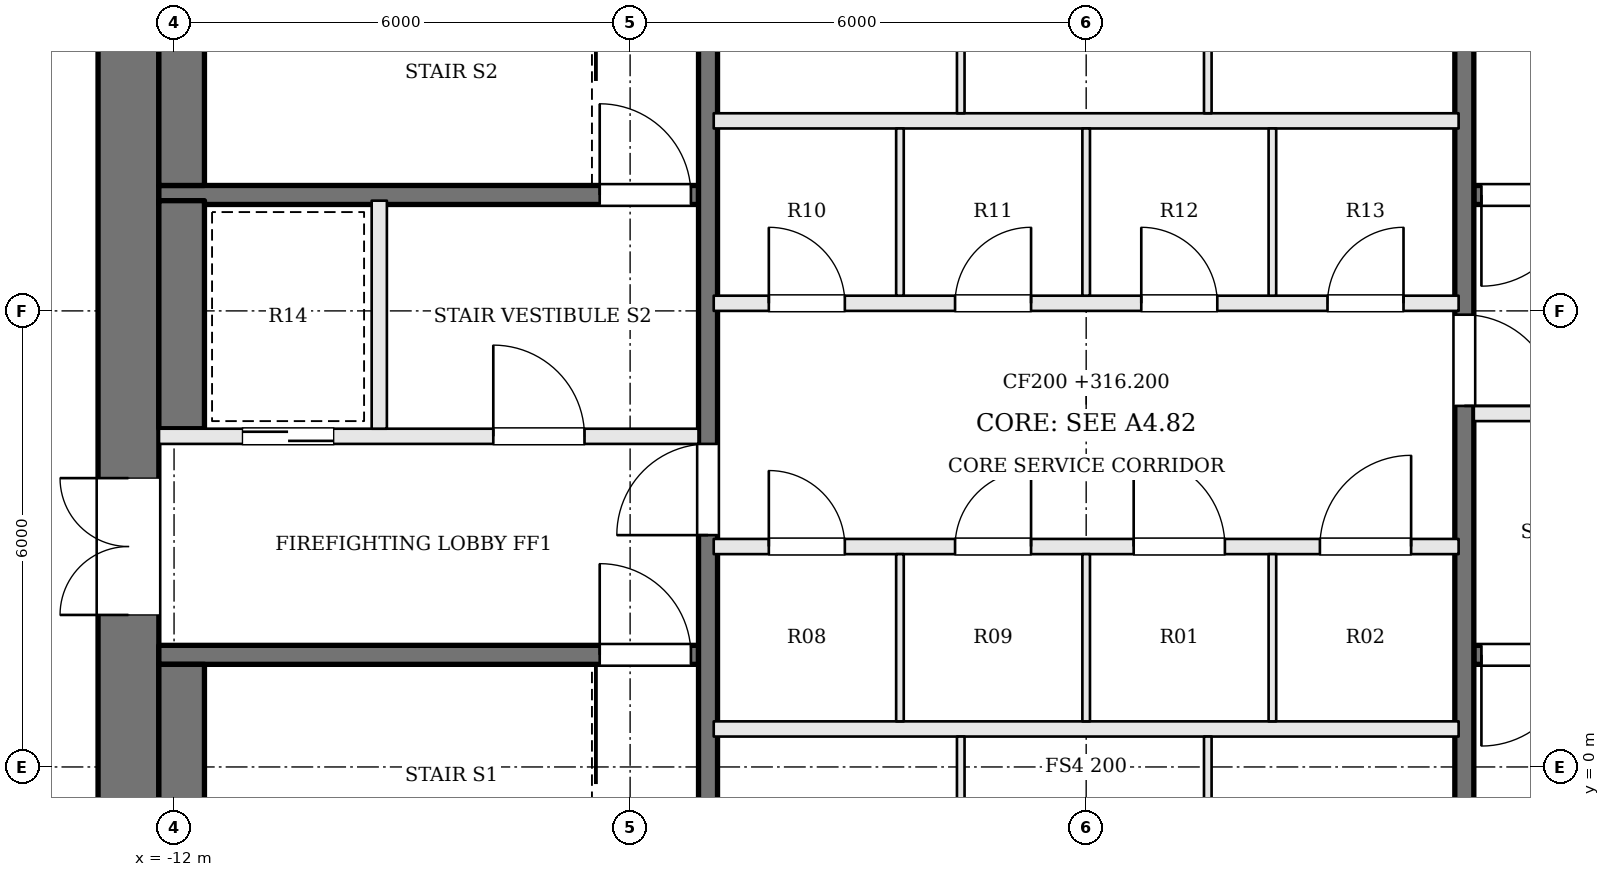
"""IFC4 building model, lengths in metres.
Left out: names, types, materials, properties, quantities, classifications, styles, units other than length and angle.
Written with IfcOpenShell. Run it as: python <this file> out.ifc"""

import sys

from ifc_helpers import new_model, si_unit, direction, frame, frame_2d, origin, place, context, subcontext, project, spatial, rectangle, extrude, element, fill, save


model = new_model("IFC4")
c1 = context("Model", 3, precision=1e-05, world=origin(), true_north=direction((0.0, 1.0)))
c2 = subcontext(c1, "Body", "Model", "MODEL_VIEW")
j1 = project(units=[si_unit("LENGTHUNIT", "METRE"), si_unit("PLANEANGLEUNIT", "RADIAN")], contexts=[c1])
p1 = place(None, origin())
s1 = spatial("IfcSite", under=j1, at=p1, CompositionType="ELEMENT")
p2 = place(p1, origin())
s2 = spatial("IfcBuilding", under=s1, at=p2, CompositionType="ELEMENT")
p3 = place(p2, frame((0.0, 0.0, 316.2)))
s3 = spatial("IfcBuildingStorey", under=s2, at=p3, CompositionType="ELEMENT", Elevation=316.2)
p4 = place(p3, frame((-12.6, -2.2, 0.0), z_axis=(0.0, 0.0, 1.0), x_axis=(0.0, 1.0, 0.0)))
e1 = element("IfcWall", 1, at=p4, inside=s3, PredefinedType="SHEAR", context=c2, shape_type="SweptSolid", body=[
    extrude(rectangle(XDim=13.4, YDim=0.8, at=frame_2d((6.7, 0.0))), origin(), (0.0, 0.0, 1.0), 4.0),
])
p5 = place(p4, frame((4.2, 0.0, 0.0)))
e2 = element("IfcOpeningElement", 2, at=p5, cuts=e1, PredefinedType="OPENING", context=c2, shape_type="SweptSolid", body=[
    extrude(rectangle(XDim=1.8, YDim=2.1, at=frame_2d((0.9, 1.05))), frame((0.0, 0.41, 0.0), z_axis=(0.0, -1.0, 0.0), x_axis=(1.0, 0.0, 0.0)), (0.0, 0.0, 1.0), 0.82),
])
p6 = place(p3, frame((-12.2, 1.475, 0.0), z_axis=(0.0, 0.0, 1.0), x_axis=(1.0, 0.0, 0.0)))
e3 = element("IfcWall", 3, at=p6, inside=s3, PredefinedType="SOLIDWALL", context=c2, shape_type="SweptSolid", body=[
    extrude(rectangle(XDim=7.1, YDim=0.25, at=frame_2d((3.55, 0.0))), origin(), (0.0, 0.0, 1.0), 3.28),
])
p7 = place(p6, frame((5.8, 0.0, 0.0)))
e4 = element("IfcOpeningElement", 4, at=p7, cuts=e3, PredefinedType="OPENING", context=c2, shape_type="SweptSolid", body=[
    extrude(rectangle(XDim=1.2, YDim=2.1, at=frame_2d((0.6, 1.05))), frame((0.0, 0.135, 0.0), z_axis=(0.0, -1.0, 0.0), x_axis=(1.0, 0.0, 0.0)), (0.0, 0.0, 1.0), 0.27),
])
p8 = place(p3, frame((12.2, 7.525, 0.0), z_axis=(0.0, 0.0, 1.0), x_axis=(-1.0, 0.0, 0.0)))
e5 = element("IfcWall", 5, at=p8, inside=s3, PredefinedType="SOLIDWALL", context=c2, shape_type="SweptSolid", body=[
    extrude(rectangle(XDim=7.1, YDim=0.25, at=frame_2d((3.55, 0.0))), origin(), (0.0, 0.0, 1.0), 3.28),
])
p9 = place(p8, frame((5.8, 0.0, 0.0)))
e6 = element("IfcOpeningElement", 6, at=p9, cuts=e5, PredefinedType="OPENING", context=c2, shape_type="SweptSolid", body=[
    extrude(rectangle(XDim=1.2, YDim=2.1, at=frame_2d((0.6, 1.05))), frame((0.0, 0.135, 0.0), z_axis=(0.0, -1.0, 0.0), x_axis=(1.0, 0.0, 0.0)), (0.0, 0.0, 1.0), 0.27),
])
p10 = place(p3, frame((-12.2, 4.35, 0.0), z_axis=(0.0, 0.0, 1.0), x_axis=(1.0, 0.0, 0.0)))
e7 = element("IfcWall", 7, at=p10, inside=s3, PredefinedType="SOLIDWALL", context=c2, shape_type="SweptSolid", body=[
    extrude(rectangle(XDim=7.1, YDim=0.2, at=frame_2d((3.55, 0.0))), origin(), (0.0, 0.0, 1.0), 3.28),
])
p11 = place(p10, frame((4.4, 0.0, 0.0)))
e8 = element("IfcOpeningElement", 8, at=p11, cuts=e7, PredefinedType="OPENING", context=c2, shape_type="SweptSolid", body=[
    extrude(rectangle(XDim=1.2, YDim=2.1, at=frame_2d((0.6, 1.05))), frame((0.0, 0.11, 0.0), z_axis=(0.0, -1.0, 0.0), x_axis=(1.0, 0.0, 0.0)), (0.0, 0.0, 1.0), 0.22),
])
p12 = place(p10, frame((1.1, 0.0, 0.0)))
e9 = element("IfcOpeningElement", 9, at=p12, cuts=e7, PredefinedType="OPENING", context=c2, shape_type="SweptSolid", body=[
    extrude(rectangle(XDim=1.2, YDim=2.1, at=frame_2d((0.6, 1.05))), frame((0.0, 0.11, 0.0), z_axis=(0.0, -1.0, 0.0), x_axis=(1.0, 0.0, 0.0)), (0.0, 0.0, 1.0), 0.22),
])
p13 = place(p3, frame((12.2, 4.65, 0.0), z_axis=(0.0, 0.0, 1.0), x_axis=(-1.0, 0.0, 0.0)))
e10 = element("IfcWall", 10, at=p13, inside=s3, PredefinedType="SOLIDWALL", context=c2, shape_type="SweptSolid", body=[
    extrude(rectangle(XDim=7.1, YDim=0.2, at=frame_2d((3.55, 0.0))), origin(), (0.0, 0.0, 1.0), 3.28),
])
p14 = place(p13, frame((4.4, 0.0, 0.0)))
e11 = element("IfcOpeningElement", 11, at=p14, cuts=e10, PredefinedType="OPENING", context=c2, shape_type="SweptSolid", body=[
    extrude(rectangle(XDim=1.2, YDim=2.1, at=frame_2d((0.6, 1.05))), frame((0.0, 0.11, 0.0), z_axis=(0.0, -1.0, 0.0), x_axis=(1.0, 0.0, 0.0)), (0.0, 0.0, 1.0), 0.22),
])
p15 = place(p13, frame((1.1, 0.0, 0.0)))
e12 = element("IfcOpeningElement", 12, at=p15, cuts=e10, PredefinedType="OPENING", context=c2, shape_type="SweptSolid", body=[
    extrude(rectangle(XDim=1.2, YDim=2.1, at=frame_2d((0.6, 1.05))), frame((0.0, 0.11, 0.0), z_axis=(0.0, -1.0, 0.0), x_axis=(1.0, 0.0, 0.0)), (0.0, 0.0, 1.0), 0.22),
])
p16 = place(p3, frame((-12.2, 7.525, 0.0), z_axis=(0.0, 0.0, 1.0), x_axis=(1.0, 0.0, 0.0)))
e13 = element("IfcWall", 13, at=p16, inside=s3, PredefinedType="SOLIDWALL", context=c2, shape_type="SweptSolid", body=[
    extrude(rectangle(XDim=7.1, YDim=0.25, at=frame_2d((3.55, 0.0))), origin(), (0.0, 0.0, 1.0), 3.28),
])
p17 = place(p16, frame((5.8, 0.0, 0.0)))
e14 = element("IfcOpeningElement", 14, at=p17, cuts=e13, PredefinedType="OPENING", context=c2, shape_type="SweptSolid", body=[
    extrude(rectangle(XDim=1.2, YDim=2.1, at=frame_2d((0.6, 1.05))), frame((0.0, 0.135, 0.0), z_axis=(0.0, -1.0, 0.0), x_axis=(1.0, 0.0, 0.0)), (0.0, 0.0, 1.0), 0.27),
])
p18 = place(p3, frame((12.2, 1.475, 0.0), z_axis=(0.0, 0.0, 1.0), x_axis=(-1.0, 0.0, 0.0)))
e15 = element("IfcWall", 15, at=p18, inside=s3, PredefinedType="SOLIDWALL", context=c2, shape_type="SweptSolid", body=[
    extrude(rectangle(XDim=7.1, YDim=0.25, at=frame_2d((3.55, 0.0))), origin(), (0.0, 0.0, 1.0), 3.28),
])
p19 = place(p18, frame((5.8, 0.0, 0.0)))
e16 = element("IfcOpeningElement", 16, at=p19, cuts=e15, PredefinedType="OPENING", context=c2, shape_type="SweptSolid", body=[
    extrude(rectangle(XDim=1.2, YDim=2.1, at=frame_2d((0.6, 1.05))), frame((0.0, 0.135, 0.0), z_axis=(0.0, -1.0, 0.0), x_axis=(1.0, 0.0, 0.0)), (0.0, 0.0, 1.0), 0.27),
])
p20 = place(p3, frame((-9.3, 4.45, 0.0), z_axis=(0.0, 0.0, 1.0), x_axis=(0.0, 1.0, 0.0)))
e17 = element("IfcWall", 17, at=p20, inside=s3, PredefinedType="SOLIDWALL", context=c2, shape_type="SweptSolid", body=[
    extrude(rectangle(XDim=3.0, YDim=0.2, at=frame_2d((1.5, 0.0))), origin(), (0.0, 0.0, 1.0), 3.28),
])
p21 = place(p3, frame((-4.975, -2.2, 0.0), z_axis=(0.0, 0.0, 1.0), x_axis=(0.0, 1.0, 0.0)))
e18 = element("IfcWall", 18, at=p21, inside=s3, PredefinedType="SOLIDWALL", context=c2, shape_type="SweptSolid", body=[
    extrude(rectangle(XDim=13.4, YDim=0.25, at=frame_2d((6.7, 0.0))), origin(), (0.0, 0.0, 1.0), 3.28),
])
p22 = place(p21, frame((5.25, 0.0, 0.0)))
e19 = element("IfcOpeningElement", 19, at=p22, cuts=e18, PredefinedType="OPENING", context=c2, shape_type="SweptSolid", body=[
    extrude(rectangle(XDim=1.2, YDim=2.1, at=frame_2d((0.6, 1.05))), frame((0.0, 0.135, 0.0), z_axis=(0.0, -1.0, 0.0), x_axis=(1.0, 0.0, 0.0)), (0.0, 0.0, 1.0), 0.27),
])
p23 = place(p3, frame((4.975, 11.2, 0.0), z_axis=(0.0, 0.0, 1.0), x_axis=(0.0, -1.0, 0.0)))
e20 = element("IfcWall", 20, at=p23, inside=s3, PredefinedType="SOLIDWALL", context=c2, shape_type="SweptSolid", body=[
    extrude(rectangle(XDim=13.4, YDim=0.25, at=frame_2d((6.7, 0.0))), origin(), (0.0, 0.0, 1.0), 3.28),
])
p24 = place(p23, frame((5.25, 0.0, 0.0)))
e21 = element("IfcOpeningElement", 21, at=p24, cuts=e20, PredefinedType="OPENING", context=c2, shape_type="SweptSolid", body=[
    extrude(rectangle(XDim=1.2, YDim=2.1, at=frame_2d((0.6, 1.05))), frame((0.0, 0.135, 0.0), z_axis=(0.0, -1.0, 0.0), x_axis=(1.0, 0.0, 0.0)), (0.0, 0.0, 1.0), 0.27),
])
p25 = place(p3, frame((-11.9, -1.6, 0.0), z_axis=(0.0, 0.0, 1.0), x_axis=(0.0, 1.0, 0.0)))
e22 = element("IfcWall", 22, at=p25, inside=s3, PredefinedType="SOLIDWALL", context=c2, shape_type="SweptSolid", body=[
    extrude(rectangle(XDim=2.95, YDim=0.6, at=frame_2d((1.475, 0.0))), origin(), (0.0, 0.0, 1.0), 3.28),
])
p26 = place(p3, frame((-11.9, 4.45, 0.0), z_axis=(0.0, 0.0, 1.0), x_axis=(0.0, 1.0, 0.0)))
e23 = element("IfcWall", 23, at=p26, inside=s3, PredefinedType="SOLIDWALL", context=c2, shape_type="SweptSolid", body=[
    extrude(rectangle(XDim=3.0, YDim=0.6, at=frame_2d((1.5, 0.0))), origin(), (0.0, 0.0, 1.0), 3.28),
])
p27 = place(p3, frame((-11.9, 7.65, 0.0), z_axis=(0.0, 0.0, 1.0), x_axis=(0.0, 1.0, 0.0)))
e24 = element("IfcWall", 24, at=p27, inside=s3, PredefinedType="SOLIDWALL", context=c2, shape_type="SweptSolid", body=[
    extrude(rectangle(XDim=2.95, YDim=0.6, at=frame_2d((1.475, 0.0))), origin(), (0.0, 0.0, 1.0), 3.28),
])
p28 = place(p3, frame((-4.9, 0.5, 0.0), z_axis=(0.0, 0.0, 1.0), x_axis=(1.0, 0.0, 0.0)))
e25 = element("IfcWall", 25, at=p28, inside=s3, PredefinedType="SOLIDWALL", context=c2, shape_type="SweptSolid", body=[
    extrude(rectangle(XDim=9.8, YDim=0.2, at=frame_2d((4.9, 0.0))), origin(), (0.0, 0.0, 1.0), 3.28),
])
p29 = place(p3, frame((-4.9, 2.9, 0.0), z_axis=(0.0, 0.0, 1.0), x_axis=(1.0, 0.0, 0.0)))
e26 = element("IfcWall", 26, at=p29, inside=s3, PredefinedType="SOLIDWALL", context=c2, shape_type="SweptSolid", body=[
    extrude(rectangle(XDim=9.8, YDim=0.2, at=frame_2d((4.9, 0.0))), origin(), (0.0, 0.0, 1.0), 3.28),
])
p30 = place(p29, frame((0.725, 0.0, 0.0)))
e27 = element("IfcOpeningElement", 27, at=p30, cuts=e26, PredefinedType="OPENING", context=c2, shape_type="SweptSolid", body=[
    extrude(rectangle(XDim=1.0, YDim=2.1, at=frame_2d((0.5, 1.05))), frame((0.0, 0.11, 0.0), z_axis=(0.0, -1.0, 0.0), x_axis=(1.0, 0.0, 0.0)), (0.0, 0.0, 1.0), 0.22),
])
p31 = place(p29, frame((3.175, 0.0, 0.0)))
e28 = element("IfcOpeningElement", 28, at=p31, cuts=e26, PredefinedType="OPENING", context=c2, shape_type="SweptSolid", body=[
    extrude(rectangle(XDim=1.0, YDim=2.1, at=frame_2d((0.5, 1.05))), frame((0.0, 0.11, 0.0), z_axis=(0.0, -1.0, 0.0), x_axis=(1.0, 0.0, 0.0)), (0.0, 0.0, 1.0), 0.22),
])
p32 = place(p29, frame((5.525, 0.0, 0.0)))
e29 = element("IfcOpeningElement", 29, at=p32, cuts=e26, PredefinedType="OPENING", context=c2, shape_type="SweptSolid", body=[
    extrude(rectangle(XDim=1.2, YDim=2.1, at=frame_2d((0.6, 1.05))), frame((0.0, 0.11, 0.0), z_axis=(0.0, -1.0, 0.0), x_axis=(1.0, 0.0, 0.0)), (0.0, 0.0, 1.0), 0.22),
])
p33 = place(p29, frame((7.975, 0.0, 0.0)))
e30 = element("IfcOpeningElement", 30, at=p33, cuts=e26, PredefinedType="OPENING", context=c2, shape_type="SweptSolid", body=[
    extrude(rectangle(XDim=1.2, YDim=2.1, at=frame_2d((0.6, 1.05))), frame((0.0, 0.11, 0.0), z_axis=(0.0, -1.0, 0.0), x_axis=(1.0, 0.0, 0.0)), (0.0, 0.0, 1.0), 0.22),
])
p34 = place(p3, frame((-4.9, 6.1, 0.0), z_axis=(0.0, 0.0, 1.0), x_axis=(1.0, 0.0, 0.0)))
e31 = element("IfcWall", 31, at=p34, inside=s3, PredefinedType="SOLIDWALL", context=c2, shape_type="SweptSolid", body=[
    extrude(rectangle(XDim=9.8, YDim=0.2, at=frame_2d((4.9, 0.0))), origin(), (0.0, 0.0, 1.0), 3.28),
])
p35 = place(p34, frame((0.725, 0.0, 0.0)))
e32 = element("IfcOpeningElement", 32, at=p35, cuts=e31, PredefinedType="OPENING", context=c2, shape_type="SweptSolid", body=[
    extrude(rectangle(XDim=1.0, YDim=2.1, at=frame_2d((0.5, 1.05))), frame((0.0, 0.11, 0.0), z_axis=(0.0, -1.0, 0.0), x_axis=(1.0, 0.0, 0.0)), (0.0, 0.0, 1.0), 0.22),
])
p36 = place(p34, frame((3.175, 0.0, 0.0)))
e33 = element("IfcOpeningElement", 33, at=p36, cuts=e31, PredefinedType="OPENING", context=c2, shape_type="SweptSolid", body=[
    extrude(rectangle(XDim=1.0, YDim=2.1, at=frame_2d((0.5, 1.05))), frame((0.0, 0.11, 0.0), z_axis=(0.0, -1.0, 0.0), x_axis=(1.0, 0.0, 0.0)), (0.0, 0.0, 1.0), 0.22),
])
p37 = place(p34, frame((5.625, 0.0, 0.0)))
e34 = element("IfcOpeningElement", 34, at=p37, cuts=e31, PredefinedType="OPENING", context=c2, shape_type="SweptSolid", body=[
    extrude(rectangle(XDim=1.0, YDim=2.1, at=frame_2d((0.5, 1.05))), frame((0.0, 0.11, 0.0), z_axis=(0.0, -1.0, 0.0), x_axis=(1.0, 0.0, 0.0)), (0.0, 0.0, 1.0), 0.22),
])
p38 = place(p34, frame((8.075, 0.0, 0.0)))
e35 = element("IfcOpeningElement", 35, at=p38, cuts=e31, PredefinedType="OPENING", context=c2, shape_type="SweptSolid", body=[
    extrude(rectangle(XDim=1.0, YDim=2.1, at=frame_2d((0.5, 1.05))), frame((0.0, 0.11, 0.0), z_axis=(0.0, -1.0, 0.0), x_axis=(1.0, 0.0, 0.0)), (0.0, 0.0, 1.0), 0.22),
])
p39 = place(p3, frame((-4.9, 8.5, 0.0), z_axis=(0.0, 0.0, 1.0), x_axis=(1.0, 0.0, 0.0)))
e36 = element("IfcWall", 36, at=p39, inside=s3, PredefinedType="SOLIDWALL", context=c2, shape_type="SweptSolid", body=[
    extrude(rectangle(XDim=9.8, YDim=0.2, at=frame_2d((4.9, 0.0))), origin(), (0.0, 0.0, 1.0), 3.28),
])
for number, where, z_axis, x_axis in (
    (37, (-2.45, 0.6, 0.0), (0.0, 0.0, 1.0), (0.0, 1.0, 0.0)),
    (38, (0.0, 0.6, 0.0), (0.0, 0.0, 1.0), (0.0, 1.0, 0.0)),
    (39, (2.45, 0.6, 0.0), (0.0, 0.0, 1.0), (0.0, 1.0, 0.0)),
    (40, (-2.45, 6.2, 0.0), (0.0, 0.0, 1.0), (0.0, 1.0, 0.0)),
    (41, (0.0, 6.2, 0.0), (0.0, 0.0, 1.0), (0.0, 1.0, 0.0)),
    (42, (2.45, 6.2, 0.0), (0.0, 0.0, 1.0), (0.0, 1.0, 0.0)),
):
    element("IfcWall", number, at=place(p3, frame(where, z_axis=z_axis, x_axis=x_axis)), inside=s3, PredefinedType="PARTITIONING", context=c2, shape_type="SweptSolid", body=[
        extrude(rectangle(XDim=2.2, YDim=0.1, at=frame_2d((1.1, 0.0))), origin(), (0.0, 0.0, 1.0), 3.28),
    ])
for number, where, z_axis, x_axis in (
    (43, (-1.65, -2.2, 0.0), (0.0, 0.0, 1.0), (0.0, 1.0, 0.0)),
    (44, (1.6, -2.2, 0.0), (0.0, 0.0, 1.0), (0.0, 1.0, 0.0)),
    (45, (-1.65, 8.6, 0.0), (0.0, 0.0, 1.0), (0.0, 1.0, 0.0)),
    (46, (1.6, 8.6, 0.0), (0.0, 0.0, 1.0), (0.0, 1.0, 0.0)),
):
    element("IfcWall", number, at=place(p3, frame(where, z_axis=z_axis, x_axis=x_axis)), inside=s3, PredefinedType="PARTITIONING", context=c2, shape_type="SweptSolid", body=[
        extrude(rectangle(XDim=2.6, YDim=0.1, at=frame_2d((1.3, 0.0))), origin(), (0.0, 0.0, 1.0), 3.28),
    ])
p40 = place(p5, origin())
e47 = element("IfcDoor", 47, at=p40, inside=s3, OperationType="DOUBLE_DOOR_SINGLE_SWING", PredefinedType="DOOR", context=c2, shape_type="SweptSolid", body=[
    extrude(rectangle(XDim=1.8, YDim=2.1, at=frame_2d((0.9, 1.05))), frame((0.0, 0.025, 0.0), z_axis=(0.0, -1.0, 0.0), x_axis=(1.0, 0.0, 0.0)), (0.0, 0.0, 1.0), 0.05),
])
fill(e2, e47)
p41 = place(p22, origin())
e48 = element("IfcDoor", 48, at=p41, inside=s3, OperationType="SINGLE_SWING_LEFT", PredefinedType="DOOR", context=c2, shape_type="SweptSolid", body=[
    extrude(rectangle(XDim=1.2, YDim=2.1, at=frame_2d((0.6, 1.05))), frame((0.0, 0.025, 0.0), z_axis=(0.0, -1.0, 0.0), x_axis=(1.0, 0.0, 0.0)), (0.0, 0.0, 1.0), 0.05),
])
fill(e19, e48)
p42 = place(p24, origin())
e49 = element("IfcDoor", 49, at=p42, inside=s3, OperationType="SINGLE_SWING_RIGHT", PredefinedType="DOOR", context=c2, shape_type="SweptSolid", body=[
    extrude(rectangle(XDim=1.2, YDim=2.1, at=frame_2d((0.6, 1.05))), frame((0.0, 0.025, 0.0), z_axis=(0.0, -1.0, 0.0), x_axis=(1.0, 0.0, 0.0)), (0.0, 0.0, 1.0), 0.05),
])
fill(e21, e49)
p43 = place(p11, origin())
e50 = element("IfcDoor", 50, at=p43, inside=s3, OperationType="SINGLE_SWING_LEFT", PredefinedType="DOOR", context=c2, shape_type="SweptSolid", body=[
    extrude(rectangle(XDim=1.2, YDim=2.1, at=frame_2d((0.6, 1.05))), frame((0.0, 0.025, 0.0), z_axis=(0.0, -1.0, 0.0), x_axis=(1.0, 0.0, 0.0)), (0.0, 0.0, 1.0), 0.05),
])
fill(e8, e50)
p44 = place(p7, origin())
e51 = element("IfcDoor", 51, at=p44, inside=s3, OperationType="SINGLE_SWING_LEFT", PredefinedType="DOOR", context=c2, shape_type="SweptSolid", body=[
    extrude(rectangle(XDim=1.2, YDim=2.1, at=frame_2d((0.6, 1.05))), frame((0.0, 0.025, 0.0), z_axis=(0.0, -1.0, 0.0), x_axis=(1.0, 0.0, 0.0)), (0.0, 0.0, 1.0), 0.05),
])
fill(e4, e51)
p45 = place(p9, origin())
e52 = element("IfcDoor", 52, at=p45, inside=s3, OperationType="SINGLE_SWING_RIGHT", PredefinedType="DOOR", context=c2, shape_type="SweptSolid", body=[
    extrude(rectangle(XDim=1.2, YDim=2.1, at=frame_2d((0.6, 1.05))), frame((0.0, 0.025, 0.0), z_axis=(0.0, -1.0, 0.0), x_axis=(1.0, 0.0, 0.0)), (0.0, 0.0, 1.0), 0.05),
])
fill(e6, e52)
p46 = place(p17, origin())
e53 = element("IfcDoor", 53, at=p46, inside=s3, OperationType="SINGLE_SWING_LEFT", PredefinedType="DOOR", context=c2, shape_type="SweptSolid", body=[
    extrude(rectangle(XDim=1.2, YDim=2.1, at=frame_2d((0.6, 1.05))), frame((0.0, 0.025, 0.0), z_axis=(0.0, -1.0, 0.0), x_axis=(1.0, 0.0, 0.0)), (0.0, 0.0, 1.0), 0.05),
])
fill(e14, e53)
p47 = place(p19, origin())
e54 = element("IfcDoor", 54, at=p47, inside=s3, OperationType="SINGLE_SWING_RIGHT", PredefinedType="DOOR", context=c2, shape_type="SweptSolid", body=[
    extrude(rectangle(XDim=1.2, YDim=2.1, at=frame_2d((0.6, 1.05))), frame((0.0, 0.025, 0.0), z_axis=(0.0, -1.0, 0.0), x_axis=(1.0, 0.0, 0.0)), (0.0, 0.0, 1.0), 0.05),
])
fill(e16, e54)
p48 = place(p12, origin())
e55 = element("IfcDoor", 55, at=p48, inside=s3, OperationType="SLIDING_TO_RIGHT", PredefinedType="DOOR", context=c2, shape_type="SweptSolid", body=[
    extrude(rectangle(XDim=1.2, YDim=2.1, at=frame_2d((0.6, 1.05))), frame((0.0, 0.025, 0.0), z_axis=(0.0, -1.0, 0.0), x_axis=(1.0, 0.0, 0.0)), (0.0, 0.0, 1.0), 0.05),
])
fill(e9, e55)
p49 = place(p30, origin())
e56 = element("IfcDoor", 56, at=p49, inside=s3, OperationType="SINGLE_SWING_LEFT", PredefinedType="DOOR", context=c2, shape_type="SweptSolid", body=[
    extrude(rectangle(XDim=1.0, YDim=2.1, at=frame_2d((0.5, 1.05))), frame((0.0, 0.025, 0.0), z_axis=(0.0, -1.0, 0.0), x_axis=(1.0, 0.0, 0.0)), (0.0, 0.0, 1.0), 0.05),
])
fill(e27, e56)
p50 = place(p31, origin())
e57 = element("IfcDoor", 57, at=p50, inside=s3, OperationType="SINGLE_SWING_RIGHT", PredefinedType="DOOR", context=c2, shape_type="SweptSolid", body=[
    extrude(rectangle(XDim=1.0, YDim=2.1, at=frame_2d((0.5, 1.05))), frame((0.0, 0.025, 0.0), z_axis=(0.0, -1.0, 0.0), x_axis=(1.0, 0.0, 0.0)), (0.0, 0.0, 1.0), 0.05),
])
fill(e28, e57)
p51 = place(p32, origin())
e58 = element("IfcDoor", 58, at=p51, inside=s3, OperationType="SINGLE_SWING_LEFT", PredefinedType="DOOR", context=c2, shape_type="SweptSolid", body=[
    extrude(rectangle(XDim=1.2, YDim=2.1, at=frame_2d((0.6, 1.05))), frame((0.0, 0.025, 0.0), z_axis=(0.0, -1.0, 0.0), x_axis=(1.0, 0.0, 0.0)), (0.0, 0.0, 1.0), 0.05),
])
fill(e29, e58)
p52 = place(p33, origin())
e59 = element("IfcDoor", 59, at=p52, inside=s3, OperationType="SINGLE_SWING_RIGHT", PredefinedType="DOOR", context=c2, shape_type="SweptSolid", body=[
    extrude(rectangle(XDim=1.2, YDim=2.1, at=frame_2d((0.6, 1.05))), frame((0.0, 0.025, 0.0), z_axis=(0.0, -1.0, 0.0), x_axis=(1.0, 0.0, 0.0)), (0.0, 0.0, 1.0), 0.05),
])
fill(e30, e59)
p53 = place(p35, origin())
e60 = element("IfcDoor", 60, at=p53, inside=s3, OperationType="SINGLE_SWING_LEFT", PredefinedType="DOOR", context=c2, shape_type="SweptSolid", body=[
    extrude(rectangle(XDim=1.0, YDim=2.1, at=frame_2d((0.5, 1.05))), frame((0.0, 0.025, 0.0), z_axis=(0.0, -1.0, 0.0), x_axis=(1.0, 0.0, 0.0)), (0.0, 0.0, 1.0), 0.05),
])
fill(e32, e60)
p54 = place(p36, origin())
e61 = element("IfcDoor", 61, at=p54, inside=s3, OperationType="SINGLE_SWING_RIGHT", PredefinedType="DOOR", context=c2, shape_type="SweptSolid", body=[
    extrude(rectangle(XDim=1.0, YDim=2.1, at=frame_2d((0.5, 1.05))), frame((0.0, 0.025, 0.0), z_axis=(0.0, -1.0, 0.0), x_axis=(1.0, 0.0, 0.0)), (0.0, 0.0, 1.0), 0.05),
])
fill(e33, e61)
p55 = place(p37, origin())
e62 = element("IfcDoor", 62, at=p55, inside=s3, OperationType="SINGLE_SWING_LEFT", PredefinedType="DOOR", context=c2, shape_type="SweptSolid", body=[
    extrude(rectangle(XDim=1.0, YDim=2.1, at=frame_2d((0.5, 1.05))), frame((0.0, 0.025, 0.0), z_axis=(0.0, -1.0, 0.0), x_axis=(1.0, 0.0, 0.0)), (0.0, 0.0, 1.0), 0.05),
])
fill(e34, e62)
p56 = place(p38, origin())
e63 = element("IfcDoor", 63, at=p56, inside=s3, OperationType="SINGLE_SWING_RIGHT", PredefinedType="DOOR", context=c2, shape_type="SweptSolid", body=[
    extrude(rectangle(XDim=1.0, YDim=2.1, at=frame_2d((0.5, 1.05))), frame((0.0, 0.025, 0.0), z_axis=(0.0, -1.0, 0.0), x_axis=(1.0, 0.0, 0.0)), (0.0, 0.0, 1.0), 0.05),
])
fill(e35, e63)
save(model, sys.argv[1])
